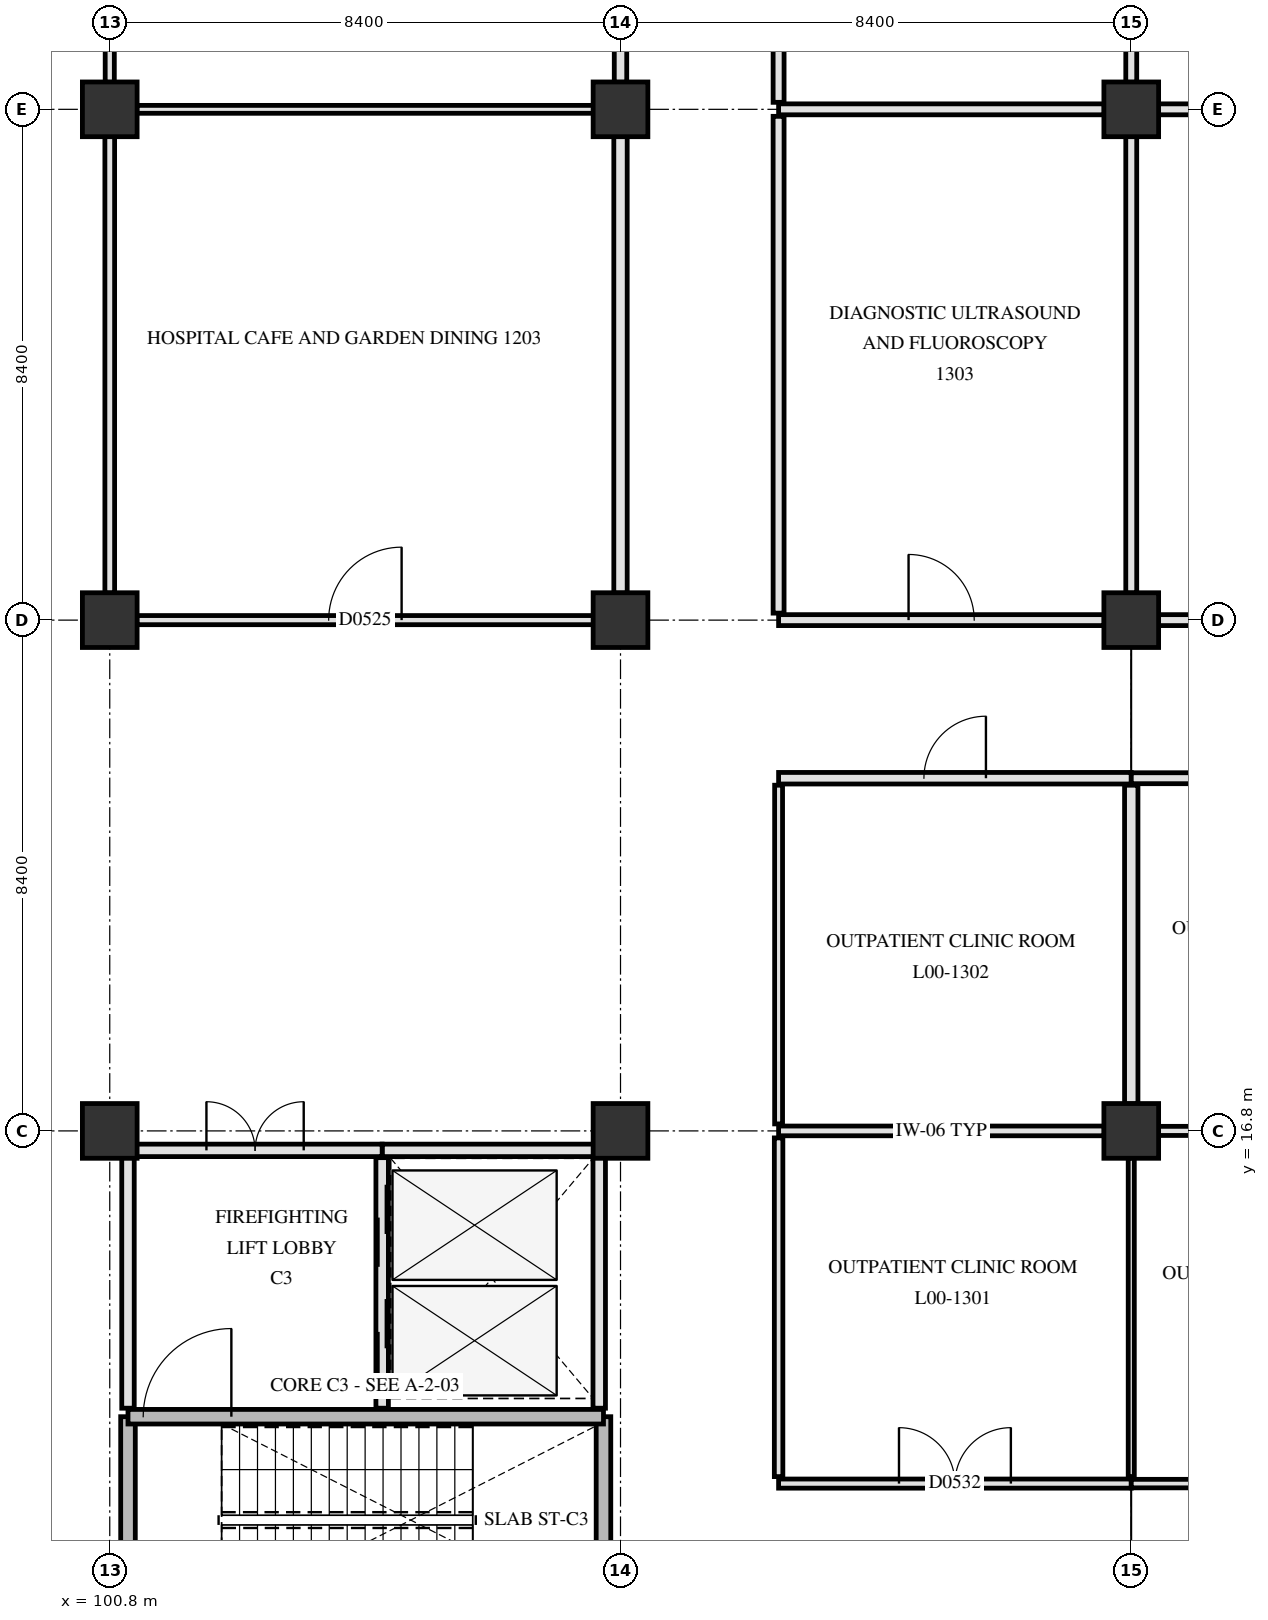
"""IFC4 building model, lengths in metres.
Left out: names, types, materials, properties, quantities, classifications, styles, units other than length and angle.
Written with IfcOpenShell. Run it as: python <this file> out.ifc"""

import sys

from ifc_helpers import new_model, si_unit, direction, frame, frame_2d, origin, origin_2d, place, context, subcontext, project, spatial, rectangle, extrude, element, fill, save


model = new_model("IFC4")
c1 = context("Model", 3, precision=1e-05, world=origin(), true_north=direction((0.0, 1.0)))
c2 = subcontext(c1, "Body", "Model", "MODEL_VIEW")
j1 = project(units=[si_unit("LENGTHUNIT", "METRE"), si_unit("PLANEANGLEUNIT", "RADIAN")], contexts=[c1])
p1 = place(None, origin())
s1 = spatial("IfcSite", under=j1, at=p1, CompositionType="ELEMENT")
p2 = place(p1, origin())
s2 = spatial("IfcBuilding", under=s1, at=p2, CompositionType="ELEMENT")
p3 = place(p2, origin())
s3 = spatial("IfcBuildingStorey", under=s2, at=p3, CompositionType="ELEMENT", Elevation=0.0)
for number, where, z_axis, x_axis in (
    (1, (100.8, 16.8, 0.0), (0.0, 0.0, 1.0), (1.0, 0.0, 0.0)),
    (2, (100.8, 25.2, 0.0), (0.0, 0.0, 1.0), (1.0, 0.0, 0.0)),
    (3, (100.8, 33.6, 0.0), (0.0, 0.0, 1.0), (1.0, 0.0, 0.0)),
    (4, (109.2, 16.8, 0.0), (0.0, 0.0, 1.0), (1.0, 0.0, 0.0)),
    (5, (109.2, 25.2, 0.0), (0.0, 0.0, 1.0), (1.0, 0.0, 0.0)),
    (6, (109.2, 33.6, 0.0), (0.0, 0.0, 1.0), (1.0, 0.0, 0.0)),
    (7, (117.6, 16.8, 0.0), (0.0, 0.0, 1.0), (1.0, 0.0, 0.0)),
    (8, (117.6, 25.2, 0.0), (0.0, 0.0, 1.0), (1.0, 0.0, 0.0)),
    (9, (117.6, 33.6, 0.0), (0.0, 0.0, 1.0), (1.0, 0.0, 0.0)),
):
    element("IfcColumn", number, at=place(p3, frame(where, z_axis=z_axis, x_axis=x_axis)), inside=s3, PredefinedType="COLUMN", context=c2, shape_type="SweptSolid", body=[
        extrude(rectangle(XDim=0.9, YDim=0.9, at=origin_2d()), origin(), (0.0, 0.0, 1.0), 4.8),
    ])
for number, where, z_axis, x_axis in (
    (10, (101.1, 8.78, 0.0), (0.0, 0.0, 1.0), (0.0, 1.0, 0.0)),
    (11, (108.92, 8.78, 0.0), (0.0, 0.0, 1.0), (0.0, 1.0, 0.0)),
):
    element("IfcWall", number, at=place(p3, frame(where, z_axis=z_axis, x_axis=x_axis)), inside=s3, PredefinedType="SHEAR", context=c2, shape_type="SweptSolid", body=[
        extrude(rectangle(XDim=3.32, YDim=0.24, at=frame_2d((1.66, 0.0))), origin(), (0.0, 0.0, 1.0), 4.5),
    ])
p4 = place(p3, frame((101.1, 12.1, 0.0), z_axis=(0.0, 0.0, 1.0), x_axis=(1.0, 0.0, 0.0)))
e12 = element("IfcWall", 12, at=p4, inside=s3, PredefinedType="SHEAR", context=c2, shape_type="SweptSolid", body=[
    extrude(rectangle(XDim=7.82, YDim=0.24, at=frame_2d((3.91, 0.0))), origin(), (0.0, 0.0, 1.0), 4.5),
])
p5 = place(p4, frame((0.25, 0.0, 0.0)))
e13 = element("IfcOpeningElement", 13, at=p5, cuts=e12, PredefinedType="OPENING", context=c2, shape_type="SweptSolid", body=[
    extrude(rectangle(XDim=1.45, YDim=2.2, at=frame_2d((0.725, 1.1))), frame((0.0, 0.13, 0.0), z_axis=(0.0, -1.0, 0.0), x_axis=(1.0, 0.0, 0.0)), (0.0, 0.0, 1.0), 0.26),
])
p6 = place(p3, frame((105.28, 12.24, 0.0), z_axis=(0.0, 0.0, 1.0), x_axis=(0.0, 1.0, 0.0)))
e14 = element("IfcWall", 14, at=p6, inside=s3, PredefinedType="PARTITIONING", context=c2, shape_type="SweptSolid", body=[
    extrude(rectangle(XDim=4.12, YDim=0.205, at=frame_2d((2.06, 0.0))), origin(), (0.0, 0.0, 1.0), 4.49),
])
p7 = place(p6, frame((0.445, 0.0, 0.0)))
e15 = element("IfcOpeningElement", 15, at=p7, cuts=e14, PredefinedType="OPENING", context=c2, shape_type="SweptSolid", body=[
    extrude(rectangle(XDim=1.35, YDim=2.2, at=frame_2d((0.675, 1.1))), frame((0.0, 0.113, 0.0), z_axis=(0.0, -1.0, 0.0), x_axis=(1.0, 0.0, 0.0)), (0.0, 0.0, 1.0), 0.225),
])
p8 = place(p6, frame((2.325, 0.0, 0.0)))
e16 = element("IfcOpeningElement", 16, at=p8, cuts=e14, PredefinedType="OPENING", context=c2, shape_type="SweptSolid", body=[
    extrude(rectangle(XDim=1.35, YDim=2.2, at=frame_2d((0.675, 1.1))), frame((0.0, 0.113, 0.0), z_axis=(0.0, -1.0, 0.0), x_axis=(1.0, 0.0, 0.0)), (0.0, 0.0, 1.0), 0.225),
])
p9 = place(p3, frame((108.85, 12.24, 0.0), z_axis=(0.0, 0.0, 1.0), x_axis=(0.0, 1.0, 0.0)))
e17 = element("IfcWall", 17, at=p9, inside=s3, PredefinedType="PARTITIONING", context=c2, shape_type="SweptSolid", body=[
    extrude(rectangle(XDim=4.12, YDim=0.205, at=frame_2d((2.06, 0.0))), origin(), (0.0, 0.0, 1.0), 4.49),
])
p10 = place(p3, frame((105.28, 16.48, 0.0), z_axis=(0.0, 0.0, 1.0), x_axis=(1.0, 0.0, 0.0)))
e18 = element("IfcWall", 18, at=p10, inside=s3, PredefinedType="PARTITIONING", context=c2, shape_type="SweptSolid", body=[
    extrude(rectangle(XDim=3.57, YDim=0.205, at=frame_2d((1.785, 0.0))), origin(), (0.0, 0.0, 1.0), 4.49),
])
p11 = place(p3, frame((101.1, 12.24, 0.0), z_axis=(0.0, 0.0, 1.0), x_axis=(0.0, 1.0, 0.0)))
e19 = element("IfcWall", 19, at=p11, inside=s3, PredefinedType="PARTITIONING", context=c2, shape_type="SweptSolid", body=[
    extrude(rectangle(XDim=4.12, YDim=0.205, at=frame_2d((2.06, 0.0))), origin(), (0.0, 0.0, 1.0), 3.89),
])
p12 = place(p3, frame((101.1, 16.48, 0.0), z_axis=(0.0, 0.0, 1.0), x_axis=(1.0, 0.0, 0.0)))
e20 = element("IfcWall", 20, at=p12, inside=s3, PredefinedType="PARTITIONING", context=c2, shape_type="SweptSolid", body=[
    extrude(rectangle(XDim=4.18, YDim=0.205, at=frame_2d((2.09, 0.0))), origin(), (0.0, 0.0, 1.0), 4.49),
])
p13 = place(p12, frame((1.29, 0.0, 0.0)))
e21 = element("IfcOpeningElement", 21, at=p13, cuts=e20, PredefinedType="OPENING", context=c2, shape_type="SweptSolid", body=[
    extrude(rectangle(XDim=1.6, YDim=2.25, at=frame_2d((0.8, 1.125))), frame((0.0, 0.113, 0.0), z_axis=(0.0, -1.0, 0.0), x_axis=(1.0, 0.0, 0.0)), (0.0, 0.0, 1.0), 0.225),
])
p14 = place(p3, frame((111.8, 11.0, 0.0), z_axis=(0.0, 0.0, 1.0), x_axis=(1.0, 0.0, 0.0)))
e22 = element("IfcWall", 22, at=p14, inside=s3, PredefinedType="PARTITIONING", context=c2, shape_type="SweptSolid", body=[
    extrude(rectangle(XDim=5.8, YDim=0.15, at=frame_2d((2.9, 0.0))), origin(), (0.0, 0.0, 1.0), 3.89),
])
p15 = place(p14, frame((1.98, 0.0, 0.0)))
e23 = element("IfcOpeningElement", 23, at=p15, cuts=e22, PredefinedType="OPENING", context=c2, shape_type="SweptSolid", body=[
    extrude(rectangle(XDim=1.84, YDim=2.28, at=frame_2d((0.92, 1.14))), frame((0.0, 0.085, 0.0), z_axis=(0.0, -1.0, 0.0), x_axis=(1.0, 0.0, 0.0)), (0.0, 0.0, 1.0), 0.17),
])
p16 = place(p3, frame((117.6, 11.0, 0.0), z_axis=(0.0, 0.0, 1.0), x_axis=(1.0, 0.0, 0.0)))
e24 = element("IfcWall", 24, at=p16, inside=s3, PredefinedType="PARTITIONING", context=c2, shape_type="SweptSolid", body=[
    extrude(rectangle(XDim=8.4, YDim=0.14, at=frame_2d((4.2, 0.0))), origin(), (0.0, 0.0, 1.0), 3.89),
])
p17 = place(p16, frame((3.5, 0.0, 0.0)))
e25 = element("IfcOpeningElement", 25, at=p17, cuts=e24, PredefinedType="OPENING", context=c2, shape_type="SweptSolid", body=[
    extrude(rectangle(XDim=1.4, YDim=2.2, at=frame_2d((0.7, 1.1))), frame((0.0, 0.08, 0.0), z_axis=(0.0, -1.0, 0.0), x_axis=(1.0, 0.0, 0.0)), (0.0, 0.0, 1.0), 0.16),
])
p18 = place(p3, frame((111.8, 16.8, 0.0), z_axis=(0.0, 0.0, 1.0), x_axis=(1.0, 0.0, 0.0)))
e26 = element("IfcWall", 26, at=p18, inside=s3, PredefinedType="PARTITIONING", context=c2, shape_type="SweptSolid", body=[
    extrude(rectangle(XDim=5.355, YDim=0.16, at=frame_2d((2.677, 0.0))), origin(), (0.0, 0.0, 1.0), 3.84),
])
p19 = place(p3, frame((118.045, 16.8, 0.0), z_axis=(0.0, 0.0, 1.0), x_axis=(1.0, 0.0, 0.0)))
e27 = element("IfcWall", 27, at=p19, inside=s3, PredefinedType="PARTITIONING", context=c2, shape_type="SweptSolid", body=[
    extrude(rectangle(XDim=7.51, YDim=0.15, at=frame_2d((3.755, 0.0))), origin(), (0.0, 0.0, 1.0), 3.84),
])
p20 = place(p3, frame((111.8, 22.6, 0.0), z_axis=(0.0, 0.0, 1.0), x_axis=(1.0, 0.0, 0.0)))
e28 = element("IfcWall", 28, at=p20, inside=s3, PredefinedType="PARTITIONING", context=c2, shape_type="SweptSolid", body=[
    extrude(rectangle(XDim=5.8, YDim=0.19, at=frame_2d((2.9, 0.0))), origin(), (0.0, 0.0, 1.0), 3.89),
])
p21 = place(p20, frame((2.39, 0.0, 0.0)))
e29 = element("IfcOpeningElement", 29, at=p21, cuts=e28, PredefinedType="OPENING", context=c2, shape_type="SweptSolid", body=[
    extrude(rectangle(XDim=1.02, YDim=2.12, at=frame_2d((0.51, 1.06))), frame((0.0, 0.105, 0.0), z_axis=(0.0, -1.0, 0.0), x_axis=(1.0, 0.0, 0.0)), (0.0, 0.0, 1.0), 0.21),
])
p22 = place(p3, frame((117.6, 22.6, 0.0), z_axis=(0.0, 0.0, 1.0), x_axis=(1.0, 0.0, 0.0)))
e30 = element("IfcWall", 30, at=p22, inside=s3, PredefinedType="PARTITIONING", context=c2, shape_type="SweptSolid", body=[
    extrude(rectangle(XDim=8.4, YDim=0.18, at=frame_2d((4.2, 0.0))), origin(), (0.0, 0.0, 1.0), 3.89),
])
p23 = place(p22, frame((3.525, 0.0, 0.0)))
e31 = element("IfcOpeningElement", 31, at=p23, cuts=e30, PredefinedType="OPENING", context=c2, shape_type="SweptSolid", body=[
    extrude(rectangle(XDim=1.35, YDim=2.2, at=frame_2d((0.675, 1.1))), frame((0.0, 0.1, 0.0), z_axis=(0.0, -1.0, 0.0), x_axis=(1.0, 0.0, 0.0)), (0.0, 0.0, 1.0), 0.2),
])
p24 = place(p3, frame((101.245, 25.2, 0.0), z_axis=(0.0, 0.0, 1.0), x_axis=(1.0, 0.0, 0.0)))
e32 = element("IfcWall", 32, at=p24, inside=s3, PredefinedType="PARTITIONING", context=c2, shape_type="SweptSolid", body=[
    extrude(rectangle(XDim=7.51, YDim=0.15, at=frame_2d((3.755, 0.0))), origin(), (0.0, 0.0, 1.0), 3.84),
])
p25 = place(p24, frame((3.155, 0.0, 0.0)))
e33 = element("IfcOpeningElement", 33, at=p25, cuts=e32, PredefinedType="OPENING", context=c2, shape_type="SweptSolid", body=[
    extrude(rectangle(XDim=1.2, YDim=2.15, at=frame_2d((0.6, 1.075))), frame((0.0, 0.085, 0.0), z_axis=(0.0, -1.0, 0.0), x_axis=(1.0, 0.0, 0.0)), (0.0, 0.0, 1.0), 0.17),
])
p26 = place(p3, frame((111.8, 25.2, 0.0), z_axis=(0.0, 0.0, 1.0), x_axis=(1.0, 0.0, 0.0)))
e34 = element("IfcWall", 34, at=p26, inside=s3, PredefinedType="PARTITIONING", context=c2, shape_type="SweptSolid", body=[
    extrude(rectangle(XDim=5.355, YDim=0.18, at=frame_2d((2.677, 0.0))), origin(), (0.0, 0.0, 1.0), 3.84),
])
p27 = place(p26, frame((2.137, 0.0, 0.0)))
e35 = element("IfcOpeningElement", 35, at=p27, cuts=e34, PredefinedType="OPENING", context=c2, shape_type="SweptSolid", body=[
    extrude(rectangle(XDim=1.08, YDim=2.12, at=frame_2d((0.54, 1.06))), frame((0.0, 0.1, 0.0), z_axis=(0.0, -1.0, 0.0), x_axis=(1.0, 0.0, 0.0)), (0.0, 0.0, 1.0), 0.2),
])
p28 = place(p3, frame((118.045, 25.2, 0.0), z_axis=(0.0, 0.0, 1.0), x_axis=(1.0, 0.0, 0.0)))
e36 = element("IfcWall", 36, at=p28, inside=s3, PredefinedType="PARTITIONING", context=c2, shape_type="SweptSolid", body=[
    extrude(rectangle(XDim=7.51, YDim=0.18, at=frame_2d((3.755, 0.0))), origin(), (0.0, 0.0, 1.0), 3.84),
])
p29 = place(p28, frame((3.03, 0.0, 0.0)))
e37 = element("IfcOpeningElement", 37, at=p29, cuts=e36, PredefinedType="OPENING", context=c2, shape_type="SweptSolid", body=[
    extrude(rectangle(XDim=1.45, YDim=2.2, at=frame_2d((0.725, 1.1))), frame((0.0, 0.1, 0.0), z_axis=(0.0, -1.0, 0.0), x_axis=(1.0, 0.0, 0.0)), (0.0, 0.0, 1.0), 0.2),
])
p30 = place(p3, frame((101.245, 33.6, 0.0), z_axis=(0.0, 0.0, 1.0), x_axis=(1.0, 0.0, 0.0)))
e38 = element("IfcWall", 38, at=p30, inside=s3, PredefinedType="PARTITIONING", context=c2, shape_type="SweptSolid", body=[
    extrude(rectangle(XDim=7.51, YDim=0.13, at=frame_2d((3.755, 0.0))), origin(), (0.0, 0.0, 1.0), 3.84),
])
p31 = place(p3, frame((111.8, 33.6, 0.0), z_axis=(0.0, 0.0, 1.0), x_axis=(1.0, 0.0, 0.0)))
e39 = element("IfcWall", 39, at=p31, inside=s3, PredefinedType="PARTITIONING", context=c2, shape_type="SweptSolid", body=[
    extrude(rectangle(XDim=5.355, YDim=0.18, at=frame_2d((2.677, 0.0))), origin(), (0.0, 0.0, 1.0), 3.84),
])
p32 = place(p3, frame((118.045, 33.6, 0.0), z_axis=(0.0, 0.0, 1.0), x_axis=(1.0, 0.0, 0.0)))
e40 = element("IfcWall", 40, at=p32, inside=s3, PredefinedType="PARTITIONING", context=c2, shape_type="SweptSolid", body=[
    extrude(rectangle(XDim=7.66, YDim=0.18, at=frame_2d((3.83, 0.0))), origin(), (0.0, 0.0, 1.0), 3.84),
])
p33 = place(p3, frame((100.8, 25.645, 0.0), z_axis=(0.0, 0.0, 1.0), x_axis=(0.0, 1.0, 0.0)))
e41 = element("IfcWall", 41, at=p33, inside=s3, PredefinedType="PARTITIONING", context=c2, shape_type="SweptSolid", body=[
    extrude(rectangle(XDim=7.51, YDim=0.16, at=frame_2d((3.755, 0.0))), origin(), (0.0, 0.0, 1.0), 3.89),
])
p34 = place(p3, frame((100.8, 34.045, 0.0), z_axis=(0.0, 0.0, 1.0), x_axis=(0.0, 1.0, 0.0)))
e42 = element("IfcWall", 42, at=p34, inside=s3, PredefinedType="PARTITIONING", context=c2, shape_type="SweptSolid", body=[
    extrude(rectangle(XDim=7.51, YDim=0.15, at=frame_2d((3.755, 0.0))), origin(), (0.0, 0.0, 1.0), 3.89),
])
p35 = place(p3, frame((109.2, 25.645, 0.0), z_axis=(0.0, 0.0, 1.0), x_axis=(0.0, 1.0, 0.0)))
e43 = element("IfcWall", 43, at=p35, inside=s3, PredefinedType="PARTITIONING", context=c2, shape_type="SweptSolid", body=[
    extrude(rectangle(XDim=7.51, YDim=0.22, at=frame_2d((3.755, 0.0))), origin(), (0.0, 0.0, 1.0), 4.09),
])
p36 = place(p3, frame((109.2, 34.045, 0.0), z_axis=(0.0, 0.0, 1.0), x_axis=(0.0, 1.0, 0.0)))
e44 = element("IfcWall", 44, at=p36, inside=s3, PredefinedType="PARTITIONING", context=c2, shape_type="SweptSolid", body=[
    extrude(rectangle(XDim=7.51, YDim=0.205, at=frame_2d((3.755, 0.0))), origin(), (0.0, 0.0, 1.0), 4.09),
])
p37 = place(p3, frame((111.8, 11.115, 0.0), z_axis=(0.0, 0.0, 1.0), x_axis=(0.0, 1.0, 0.0)))
e45 = element("IfcWall", 45, at=p37, inside=s3, PredefinedType="PARTITIONING", context=c2, shape_type="SweptSolid", body=[
    extrude(rectangle(XDim=5.57, YDim=0.14, at=frame_2d((2.785, 0.0))), origin(), (0.0, 0.0, 1.0), 3.84),
])
p38 = place(p3, frame((111.8, 16.915, 0.0), z_axis=(0.0, 0.0, 1.0), x_axis=(0.0, 1.0, 0.0)))
e46 = element("IfcWall", 46, at=p38, inside=s3, PredefinedType="PARTITIONING", context=c2, shape_type="SweptSolid", body=[
    extrude(rectangle(XDim=5.57, YDim=0.13, at=frame_2d((2.785, 0.0))), origin(), (0.0, 0.0, 1.0), 3.84),
])
p39 = place(p3, frame((111.8, 25.315, 0.0), z_axis=(0.0, 0.0, 1.0), x_axis=(0.0, 1.0, 0.0)))
e47 = element("IfcWall", 47, at=p39, inside=s3, PredefinedType="PARTITIONING", context=c2, shape_type="SweptSolid", body=[
    extrude(rectangle(XDim=8.17, YDim=0.18, at=frame_2d((4.085, 0.0))), origin(), (0.0, 0.0, 1.0), 3.84),
])
p40 = place(p3, frame((111.8, 33.715, 0.0), z_axis=(0.0, 0.0, 1.0), x_axis=(0.0, 1.0, 0.0)))
e48 = element("IfcWall", 48, at=p40, inside=s3, PredefinedType="PARTITIONING", context=c2, shape_type="SweptSolid", body=[
    extrude(rectangle(XDim=8.17, YDim=0.18, at=frame_2d((4.085, 0.0))), origin(), (0.0, 0.0, 1.0), 3.84),
])
p41 = place(p3, frame((117.6, 11.115, 0.0), z_axis=(0.0, 0.0, 1.0), x_axis=(0.0, 1.0, 0.0)))
e49 = element("IfcWall", 49, at=p41, inside=s3, PredefinedType="PARTITIONING", context=c2, shape_type="SweptSolid", body=[
    extrude(rectangle(XDim=5.24, YDim=0.1, at=frame_2d((2.62, 0.0))), origin(), (0.0, 0.0, 1.0), 3.89),
])
p42 = place(p3, frame((117.6, 17.245, 0.0), z_axis=(0.0, 0.0, 1.0), x_axis=(0.0, 1.0, 0.0)))
e50 = element("IfcWall", 50, at=p42, inside=s3, PredefinedType="PARTITIONING", context=c2, shape_type="SweptSolid", body=[
    extrude(rectangle(XDim=5.24, YDim=0.22, at=frame_2d((2.62, 0.0))), origin(), (0.0, 0.0, 1.0), 3.89),
])
for number, where, z_axis, x_axis in (
    (51, (117.6, 25.645, 0.0), (0.0, 0.0, 1.0), (0.0, 1.0, 0.0)),
    (52, (117.6, 34.045, 0.0), (0.0, 0.0, 1.0), (0.0, 1.0, 0.0)),
):
    element("IfcWall", number, at=place(p3, frame(where, z_axis=z_axis, x_axis=x_axis)), inside=s3, PredefinedType="PARTITIONING", context=c2, shape_type="SweptSolid", body=[
        extrude(rectangle(XDim=7.51, YDim=0.18, at=frame_2d((3.755, 0.0))), origin(), (0.0, 0.0, 1.0), 3.89),
    ])
p43 = place(p5, origin())
e53 = element("IfcDoor", 53, at=p43, inside=s3, OperationType="SINGLE_SWING_RIGHT", PredefinedType="DOOR", context=c2, shape_type="SweptSolid", body=[
    extrude(rectangle(XDim=1.45, YDim=2.2, at=frame_2d((0.725, 1.1))), frame((0.0, 0.025, 0.0), z_axis=(0.0, -1.0, 0.0), x_axis=(1.0, 0.0, 0.0)), (0.0, 0.0, 1.0), 0.05),
])
fill(e13, e53)
p44 = place(p7, origin())
e54 = element("IfcDoor", 54, at=p44, inside=s3, OperationType="SLIDING_TO_LEFT", PredefinedType="DOOR", context=c2, shape_type="SweptSolid", body=[
    extrude(rectangle(XDim=1.35, YDim=2.2, at=frame_2d((0.675, 1.1))), frame((0.0, 0.025, 0.0), z_axis=(0.0, -1.0, 0.0), x_axis=(1.0, 0.0, 0.0)), (0.0, 0.0, 1.0), 0.05),
])
fill(e15, e54)
p45 = place(p8, origin())
e55 = element("IfcDoor", 55, at=p45, inside=s3, OperationType="SLIDING_TO_LEFT", PredefinedType="DOOR", context=c2, shape_type="SweptSolid", body=[
    extrude(rectangle(XDim=1.35, YDim=2.2, at=frame_2d((0.675, 1.1))), frame((0.0, 0.025, 0.0), z_axis=(0.0, -1.0, 0.0), x_axis=(1.0, 0.0, 0.0)), (0.0, 0.0, 1.0), 0.05),
])
fill(e16, e55)
p46 = place(p13, origin())
e56 = element("IfcDoor", 56, at=p46, inside=s3, OperationType="DOUBLE_SWING_LEFT", PredefinedType="DOOR", context=c2, shape_type="SweptSolid", body=[
    extrude(rectangle(XDim=1.6, YDim=2.25, at=frame_2d((0.8, 1.125))), frame((0.0, 0.025, 0.0), z_axis=(0.0, -1.0, 0.0), x_axis=(1.0, 0.0, 0.0)), (0.0, 0.0, 1.0), 0.05),
])
fill(e21, e56)
p47 = place(p25, origin())
e57 = element("IfcDoor", 57, at=p47, inside=s3, OperationType="SINGLE_SWING_RIGHT", PredefinedType="DOOR", context=c2, shape_type="SweptSolid", body=[
    extrude(rectangle(XDim=1.2, YDim=2.15, at=frame_2d((0.6, 1.075))), frame((0.0, 0.025, 0.0), z_axis=(0.0, -1.0, 0.0), x_axis=(1.0, 0.0, 0.0)), (0.0, 0.0, 1.0), 0.05),
])
fill(e33, e57)
p48 = place(p15, origin())
e58 = element("IfcDoor", 58, at=p48, inside=s3, OperationType="DOUBLE_SWING_LEFT", PredefinedType="DOOR", context=c2, shape_type="SweptSolid", body=[
    extrude(rectangle(XDim=1.84, YDim=2.28, at=frame_2d((0.92, 1.14))), frame((0.0, 0.025, 0.0), z_axis=(0.0, -1.0, 0.0), x_axis=(1.0, 0.0, 0.0)), (0.0, 0.0, 1.0), 0.05),
])
fill(e23, e58)
p49 = place(p21, origin())
e59 = element("IfcDoor", 59, at=p49, inside=s3, OperationType="SINGLE_SWING_RIGHT", PredefinedType="DOOR", context=c2, shape_type="SweptSolid", body=[
    extrude(rectangle(XDim=1.02, YDim=2.12, at=frame_2d((0.51, 1.06))), frame((0.0, 0.025, 0.0), z_axis=(0.0, -1.0, 0.0), x_axis=(1.0, 0.0, 0.0)), (0.0, 0.0, 1.0), 0.05),
])
fill(e29, e59)
p50 = place(p27, origin())
e60 = element("IfcDoor", 60, at=p50, inside=s3, OperationType="SINGLE_SWING_LEFT", PredefinedType="DOOR", context=c2, shape_type="SweptSolid", body=[
    extrude(rectangle(XDim=1.08, YDim=2.12, at=frame_2d((0.54, 1.06))), frame((0.0, 0.025, 0.0), z_axis=(0.0, -1.0, 0.0), x_axis=(1.0, 0.0, 0.0)), (0.0, 0.0, 1.0), 0.05),
])
fill(e35, e60)
save(model, sys.argv[1])
